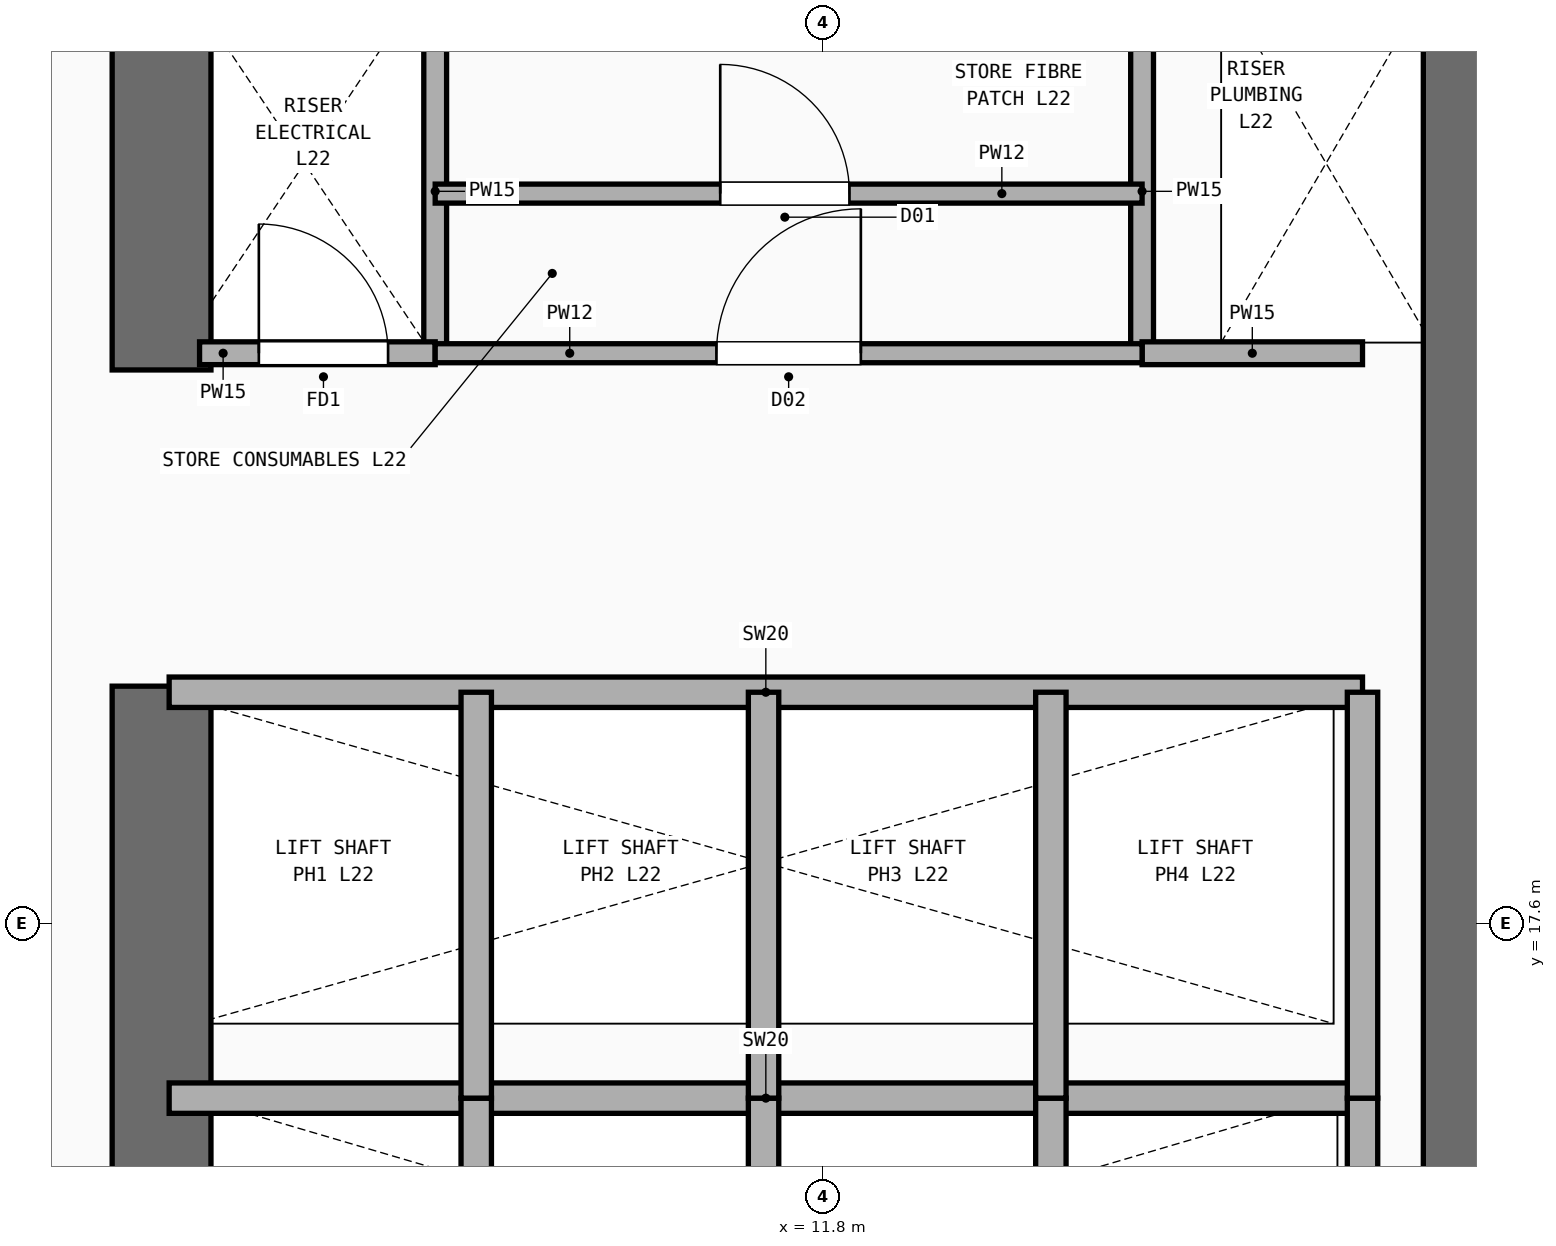
"""IFC4 building model, lengths in metres.
Left out: names, types, materials, properties, quantities, classifications, styles, units other than length and angle.
Written with IfcOpenShell. Run it as: python <this file> out.ifc"""

import sys

from ifc_helpers import new_model, si_unit, direction, frame, frame_2d, origin, place, context, subcontext, project, spatial, rectangle, extrude, element, fill, save


model = new_model("IFC4")
c1 = context("Model", 3, precision=1e-05, world=origin(), true_north=direction((0.0, 1.0)))
c2 = subcontext(c1, "Body", "Model", "MODEL_VIEW")
j1 = project(units=[si_unit("LENGTHUNIT", "METRE"), si_unit("PLANEANGLEUNIT", "RADIAN")], contexts=[c1])
p1 = place(None, origin())
s1 = spatial("IfcSite", under=j1, at=p1, CompositionType="ELEMENT")
p2 = place(p1, origin())
s2 = spatial("IfcBuilding", under=s1, at=p2, CompositionType="ELEMENT")
p3 = place(p2, frame((0.0, 0.0, 87.9)))
s3 = spatial("IfcBuildingStorey", under=s2, at=p3, CompositionType="ELEMENT", Elevation=87.9)
p4 = place(p3, frame((7.45, 14.35, 0.0), z_axis=(0.0, 0.0, 1.0), x_axis=(0.0, 1.0, 0.0)))
e1 = element("IfcWall", 1, at=p4, inside=s3, PredefinedType="SHEAR", context=c2, shape_type="SweptSolid", body=[
    extrude(rectangle(XDim=4.81, YDim=0.65, at=frame_2d((2.405, 0.0))), origin(), (0.0, 0.0, 1.0), 3.54),
])
p5 = place(p3, frame((7.45, 21.24, 0.0), z_axis=(0.0, 0.0, 1.0), x_axis=(0.0, 1.0, 0.0)))
e2 = element("IfcWall", 2, at=p5, inside=s3, PredefinedType="SHEAR", context=c2, shape_type="SweptSolid", body=[
    extrude(rectangle(XDim=2.26, YDim=0.65, at=frame_2d((1.13, 0.0))), origin(), (0.0, 0.0, 1.0), 3.54),
])
p6 = place(p3, frame((16.075, 14.4, 0.0), z_axis=(0.0, 0.0, 1.0), x_axis=(0.0, 1.0, 0.0)))
e3 = element("IfcWall", 3, at=p6, inside=s3, PredefinedType="SHEAR", context=c2, shape_type="SweptSolid", body=[
    extrude(rectangle(XDim=9.1, YDim=0.65, at=frame_2d((4.55, 0.0))), origin(), (0.0, 0.0, 1.0), 3.54),
])
p7 = place(p3, frame((7.5, 16.45, 0.0), z_axis=(0.0, 0.0, 1.0), x_axis=(1.0, 0.0, 0.0)))
e4 = element("IfcWall", 4, at=p7, inside=s3, PredefinedType="PARTITIONING", context=c2, shape_type="SweptSolid", body=[
    extrude(rectangle(XDim=7.85, YDim=0.2, at=frame_2d((3.925, 0.0))), origin(), (0.0, 0.0, 1.0), 3.54),
])
for number, where, z_axis, x_axis in (
    (5, (15.35, 14.22, 0.0), (0.0, 0.0, 1.0), (0.0, 1.0, 0.0)),
    (6, (9.52, 14.22, 0.0), (0.0, 0.0, 1.0), (0.0, 1.0, 0.0)),
    (7, (11.41, 14.22, 0.0), (0.0, 0.0, 1.0), (0.0, 1.0, 0.0)),
    (8, (13.3, 14.22, 0.0), (0.0, 0.0, 1.0), (0.0, 1.0, 0.0)),
):
    element("IfcWall", number, at=place(p3, frame(where, z_axis=z_axis, x_axis=x_axis)), inside=s3, PredefinedType="PARTITIONING", context=c2, shape_type="SweptSolid", body=[
        extrude(rectangle(XDim=2.23, YDim=0.2, at=frame_2d((1.115, 0.0))), origin(), (0.0, 0.0, 1.0), 3.54),
    ])
p8 = place(p3, frame((7.5, 19.12, 0.0), z_axis=(0.0, 0.0, 1.0), x_axis=(1.0, 0.0, 0.0)))
e9 = element("IfcWall", 9, at=p8, inside=s3, PredefinedType="PARTITIONING", context=c2, shape_type="SweptSolid", body=[
    extrude(rectangle(XDim=7.85, YDim=0.2, at=frame_2d((3.925, 0.0))), origin(), (0.0, 0.0, 1.0), 3.54),
])
for number, where, z_axis, x_axis in (
    (10, (15.35, 16.45, 0.0), (0.0, 0.0, 1.0), (0.0, 1.0, 0.0)),
    (11, (9.52, 16.45, 0.0), (0.0, 0.0, 1.0), (0.0, 1.0, 0.0)),
    (12, (11.41, 16.45, 0.0), (0.0, 0.0, 1.0), (0.0, 1.0, 0.0)),
    (13, (13.3, 16.45, 0.0), (0.0, 0.0, 1.0), (0.0, 1.0, 0.0)),
):
    element("IfcWall", number, at=place(p3, frame(where, z_axis=z_axis, x_axis=x_axis)), inside=s3, PredefinedType="PARTITIONING", context=c2, shape_type="SweptSolid", body=[
        extrude(rectangle(XDim=2.67, YDim=0.2, at=frame_2d((1.335, 0.0))), origin(), (0.0, 0.0, 1.0), 3.54),
    ])
for number, where, z_axis, x_axis in (
    (14, (9.25, 21.35, 0.0), (0.0, 0.0, 1.0), (0.0, 1.0, 0.0)),
    (15, (13.9, 21.35, 0.0), (0.0, 0.0, 1.0), (0.0, 1.0, 0.0)),
):
    element("IfcWall", number, at=place(p3, frame(where, z_axis=z_axis, x_axis=x_axis)), inside=s3, PredefinedType="PARTITIONING", context=c2, shape_type="SweptSolid", body=[
        extrude(rectangle(XDim=2.13, YDim=0.15, at=frame_2d((1.065, 0.0))), origin(), (0.0, 0.0, 1.0), 3.54),
    ])
p9 = place(p3, frame((7.7, 21.35, 0.0), z_axis=(0.0, 0.0, 1.0), x_axis=(1.0, 0.0, 0.0)))
e16 = element("IfcWall", 16, at=p9, inside=s3, PredefinedType="PARTITIONING", context=c2, shape_type="SweptSolid", body=[
    extrude(rectangle(XDim=1.55, YDim=0.15, at=frame_2d((0.775, 0.0))), origin(), (0.0, 0.0, 1.0), 3.54),
])
p10 = place(p9, frame((0.39, 0.0, 0.0)))
e17 = element("IfcOpeningElement", 17, at=p10, cuts=e16, PredefinedType="OPENING", context=c2, shape_type="SweptSolid", body=[
    extrude(rectangle(XDim=0.85, YDim=2.15, at=frame_2d((0.425, 1.075))), frame((0.0, 0.085, 0.0), z_axis=(0.0, -1.0, 0.0), x_axis=(1.0, 0.0, 0.0)), (0.0, 0.0, 1.0), 0.17),
])
p11 = place(p3, frame((13.9, 21.35, 0.0), z_axis=(0.0, 0.0, 1.0), x_axis=(1.0, 0.0, 0.0)))
e18 = element("IfcWall", 18, at=p11, inside=s3, PredefinedType="PARTITIONING", context=c2, shape_type="SweptSolid", body=[
    extrude(rectangle(XDim=1.45, YDim=0.15, at=frame_2d((0.725, 0.0))), origin(), (0.0, 0.0, 1.0), 3.54),
])
p12 = place(p3, frame((9.25, 21.35, 0.0), z_axis=(0.0, 0.0, 1.0), x_axis=(1.0, 0.0, 0.0)))
e19 = element("IfcWall", 19, at=p12, inside=s3, PredefinedType="PARTITIONING", context=c2, shape_type="SweptSolid", body=[
    extrude(rectangle(XDim=4.65, YDim=0.125, at=frame_2d((2.325, 0.0))), origin(), (0.0, 0.0, 1.0), 3.54),
])
p13 = place(p12, frame((1.85, 0.0, 0.0)))
e20 = element("IfcOpeningElement", 20, at=p13, cuts=e19, PredefinedType="OPENING", context=c2, shape_type="SweptSolid", body=[
    extrude(rectangle(XDim=0.95, YDim=2.15, at=frame_2d((0.475, 1.075))), frame((0.0, 0.073, 0.0), z_axis=(0.0, -1.0, 0.0), x_axis=(1.0, 0.0, 0.0)), (0.0, 0.0, 1.0), 0.145),
])
p14 = place(p3, frame((9.25, 22.4, 0.0), z_axis=(0.0, 0.0, 1.0), x_axis=(1.0, 0.0, 0.0)))
e21 = element("IfcWall", 21, at=p14, inside=s3, PredefinedType="PARTITIONING", context=c2, shape_type="SweptSolid", body=[
    extrude(rectangle(XDim=4.65, YDim=0.125, at=frame_2d((2.325, 0.0))), origin(), (0.0, 0.0, 1.0), 3.54),
])
p15 = place(p14, frame((1.875, 0.0, 0.0)))
e22 = element("IfcOpeningElement", 22, at=p15, cuts=e21, PredefinedType="OPENING", context=c2, shape_type="SweptSolid", body=[
    extrude(rectangle(XDim=0.85, YDim=2.15, at=frame_2d((0.425, 1.075))), frame((0.0, 0.073, 0.0), z_axis=(0.0, -1.0, 0.0), x_axis=(1.0, 0.0, 0.0)), (0.0, 0.0, 1.0), 0.145),
])
p16 = place(p10, origin())
e23 = element("IfcDoor", 23, at=p16, inside=s3, OperationType="SINGLE_SWING_LEFT", PredefinedType="DOOR", context=c2, shape_type="SweptSolid", body=[
    extrude(rectangle(XDim=0.85, YDim=2.15, at=frame_2d((0.425, 1.075))), frame((0.0, 0.025, 0.0), z_axis=(0.0, -1.0, 0.0), x_axis=(1.0, 0.0, 0.0)), (0.0, 0.0, 1.0), 0.05),
])
fill(e17, e23)
p17 = place(p13, origin())
e24 = element("IfcDoor", 24, at=p17, inside=s3, OperationType="SINGLE_SWING_RIGHT", PredefinedType="DOOR", context=c2, shape_type="SweptSolid", body=[
    extrude(rectangle(XDim=0.95, YDim=2.15, at=frame_2d((0.475, 1.075))), frame((0.0, 0.025, 0.0), z_axis=(0.0, -1.0, 0.0), x_axis=(1.0, 0.0, 0.0)), (0.0, 0.0, 1.0), 0.05),
])
fill(e20, e24)
p18 = place(p15, origin())
e25 = element("IfcDoor", 25, at=p18, inside=s3, OperationType="SINGLE_SWING_LEFT", PredefinedType="DOOR", context=c2, shape_type="SweptSolid", body=[
    extrude(rectangle(XDim=0.85, YDim=2.15, at=frame_2d((0.425, 1.075))), frame((0.0, 0.025, 0.0), z_axis=(0.0, -1.0, 0.0), x_axis=(1.0, 0.0, 0.0)), (0.0, 0.0, 1.0), 0.05),
])
fill(e22, e25)
save(model, sys.argv[1])
